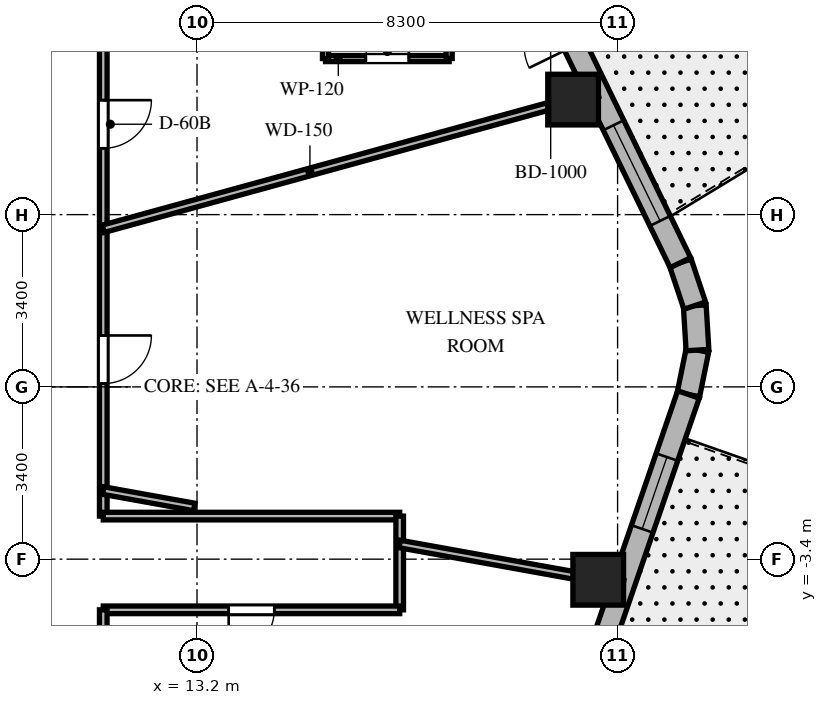
"""IFC4 building model, lengths in metres.
Left out: names, types, materials, properties, quantities, classifications, styles, units other than length and angle.
Written with IfcOpenShell. Run it as: python <this file> out.ifc"""

import sys

from ifc_helpers import new_model, si_unit, direction, frame, frame_2d, origin, origin_2d, place, context, subcontext, project, spatial, rectangle, extrude, element, fill, save


model = new_model("IFC4")
c1 = context("Model", 3, precision=1e-05, world=origin(), true_north=direction((0.0, 1.0)))
c2 = subcontext(c1, "Body", "Model", "MODEL_VIEW")
j1 = project(units=[si_unit("LENGTHUNIT", "METRE"), si_unit("PLANEANGLEUNIT", "RADIAN")], contexts=[c1])
p1 = place(None, origin())
s1 = spatial("IfcSite", under=j1, at=p1, CompositionType="ELEMENT")
p2 = place(p1, origin())
s2 = spatial("IfcBuilding", under=s1, at=p2, CompositionType="ELEMENT")
p3 = place(p2, frame((0.0, 0.0, 233.1)))
s3 = spatial("IfcBuildingStorey", under=s2, at=p3, CompositionType="ELEMENT", Elevation=233.1)
for number, where, z_axis, x_axis in (
    (1, (21.118, -3.807, 0.0), (0.0, 0.0, 1.0), (1.0, 0.0, 0.0)),
    (2, (20.622, 5.67, 0.0), (0.0, 0.0, 1.0), (1.0, 0.0, 0.0)),
):
    element("IfcColumn", number, at=place(p3, frame(where, z_axis=z_axis, x_axis=x_axis)), inside=s3, PredefinedType="COLUMN", context=c2, shape_type="SweptSolid", body=[
        extrude(rectangle(XDim=1.0, YDim=1.0, at=origin_2d()), origin(), (0.0, 0.0, 1.0), 3.8),
    ])
p4 = place(p3, frame((22.898, -0.15, 0.0), z_axis=(0.0, 0.0, 1.0), x_axis=(0.199055826889, 0.979988151858, 0.0)))
e3 = element("IfcWall", 3, at=p4, inside=s3, PredefinedType="SOLIDWALL", context=c2, shape_type="SweptSolid", body=[
    extrude(rectangle(XDim=0.894, YDim=0.45, at=frame_2d((0.447, 0.0))), origin(), (0.0, 0.0, 1.0), 3.5),
])
p5 = place(p3, frame((23.076, 0.727, 0.0), z_axis=(0.0, 0.0, 1.0), x_axis=(-0.060805222108, 0.998149650586, 0.0)))
e4 = element("IfcWall", 4, at=p5, inside=s3, PredefinedType="SOLIDWALL", context=c2, shape_type="SweptSolid", body=[
    extrude(rectangle(XDim=0.879, YDim=0.45, at=frame_2d((0.44, 0.0))), origin(), (0.0, 0.0, 1.0), 3.5),
])
p6 = place(p3, frame((23.023, 1.604, 0.0), z_axis=(0.0, 0.0, 1.0), x_axis=(-0.316801227695, 0.948491951537, 0.0)))
e5 = element("IfcWall", 5, at=p6, inside=s3, PredefinedType="SOLIDWALL", context=c2, shape_type="SweptSolid", body=[
    extrude(rectangle(XDim=0.894, YDim=0.45, at=frame_2d((0.447, 0.0))), origin(), (0.0, 0.0, 1.0), 3.5),
])
p7 = place(p3, frame((16.324, -19.275, 0.0), z_axis=(0.0, 0.0, 1.0), x_axis=(0.325083142304, 0.945685439557, 0.0)))
e6 = element("IfcWall", 6, at=p7, inside=s3, PredefinedType="SOLIDWALL", context=c2, shape_type="SweptSolid", body=[
    extrude(rectangle(XDim=20.224, YDim=0.45, at=frame_2d((10.112, 0.0))), origin(), (0.0, 0.0, 1.0), 3.5),
])
p8 = place(p7, frame((5.062, 0.0, 0.0)))
e7 = element("IfcOpeningElement", 7, at=p8, cuts=e6, PredefinedType="OPENING", context=c2, shape_type="SweptSolid", body=[
    extrude(rectangle(XDim=0.95, YDim=2.15, at=frame_2d((0.475, 1.075))), frame((0.0, 0.235, 0.0), z_axis=(0.0, -1.0, 0.0), x_axis=(1.0, 0.0, 0.0)), (0.0, 0.0, 1.0), 0.47),
])
p9 = place(p7, frame((1.253, 0.0, 0.8)))
e8 = element("IfcOpeningElement", 8, at=p9, cuts=e6, PredefinedType="OPENING", context=c2, shape_type="SweptSolid", body=[
    extrude(rectangle(XDim=1.5, YDim=1.8, at=frame_2d((0.75, 0.9))), frame((0.0, 0.235, 0.0), z_axis=(0.0, -1.0, 0.0), x_axis=(1.0, 0.0, 0.0)), (0.0, 0.0, 1.0), 0.47),
])
p10 = place(p7, frame((6.904, 0.0, 0.8)))
e9 = element("IfcOpeningElement", 9, at=p10, cuts=e6, PredefinedType="OPENING", context=c2, shape_type="SweptSolid", body=[
    extrude(rectangle(XDim=1.5, YDim=1.8, at=frame_2d((0.75, 0.9))), frame((0.0, 0.235, 0.0), z_axis=(0.0, -1.0, 0.0), x_axis=(1.0, 0.0, 0.0)), (0.0, 0.0, 1.0), 0.47),
])
p11 = place(p7, frame((11.885, 0.0, 0.8)))
e10 = element("IfcOpeningElement", 10, at=p11, cuts=e6, PredefinedType="OPENING", context=c2, shape_type="SweptSolid", body=[
    extrude(rectangle(XDim=1.5, YDim=1.8, at=frame_2d((0.75, 0.9))), frame((0.0, 0.235, 0.0), z_axis=(0.0, -1.0, 0.0), x_axis=(1.0, 0.0, 0.0)), (0.0, 0.0, 1.0), 0.47),
])
p12 = place(p7, frame((17.418, 0.0, 0.8)))
e11 = element("IfcOpeningElement", 11, at=p12, cuts=e6, PredefinedType="OPENING", context=c2, shape_type="SweptSolid", body=[
    extrude(rectangle(XDim=1.5, YDim=1.8, at=frame_2d((0.75, 0.9))), frame((0.0, 0.235, 0.0), z_axis=(0.0, -1.0, 0.0), x_axis=(1.0, 0.0, 0.0)), (0.0, 0.0, 1.0), 0.47),
])
p13 = place(p3, frame((22.74, 2.452, 0.0), z_axis=(0.0, 0.0, 1.0), x_axis=(-0.437753424814, 0.899095066755, 0.0)))
e12 = element("IfcWall", 12, at=p13, inside=s3, PredefinedType="SOLIDWALL", context=c2, shape_type="SweptSolid", body=[
    extrude(rectangle(XDim=19.137, YDim=0.45, at=frame_2d((9.569, 0.0))), origin(), (0.0, 0.0, 1.0), 3.5),
])
p14 = place(p13, frame((4.763, 0.0, 0.0)))
e13 = element("IfcOpeningElement", 13, at=p14, cuts=e12, PredefinedType="OPENING", context=c2, shape_type="SweptSolid", body=[
    extrude(rectangle(XDim=1.0, YDim=2.15, at=frame_2d((0.5, 1.075))), frame((0.0, 0.235, 0.0), z_axis=(0.0, -1.0, 0.0), x_axis=(1.0, 0.0, 0.0)), (0.0, 0.0, 1.0), 0.47),
])
p15 = place(p13, frame((6.851, 0.0, 0.8)))
e14 = element("IfcOpeningElement", 14, at=p15, cuts=e12, PredefinedType="OPENING", context=c2, shape_type="SweptSolid", body=[
    extrude(rectangle(XDim=2.1, YDim=1.85, at=frame_2d((1.05, 0.925))), frame((0.0, 0.235, 0.0), z_axis=(0.0, -1.0, 0.0), x_axis=(1.0, 0.0, 0.0)), (0.0, 0.0, 1.0), 0.47),
])
p16 = place(p13, frame((11.545, 0.0, 0.8)))
e15 = element("IfcOpeningElement", 15, at=p16, cuts=e12, PredefinedType="OPENING", context=c2, shape_type="SweptSolid", body=[
    extrude(rectangle(XDim=2.1, YDim=1.85, at=frame_2d((1.05, 0.925))), frame((0.0, 0.235, 0.0), z_axis=(0.0, -1.0, 0.0), x_axis=(1.0, 0.0, 0.0)), (0.0, 0.0, 1.0), 0.47),
])
p17 = place(p13, frame((16.173, 0.0, 0.8)))
e16 = element("IfcOpeningElement", 16, at=p17, cuts=e12, PredefinedType="OPENING", context=c2, shape_type="SweptSolid", body=[
    extrude(rectangle(XDim=2.1, YDim=1.85, at=frame_2d((1.05, 0.925))), frame((0.0, 0.235, 0.0), z_axis=(0.0, -1.0, 0.0), x_axis=(1.0, 0.0, 0.0)), (0.0, 0.0, 1.0), 0.47),
])
p18 = place(p13, frame((0.916, 0.0, 0.8)))
e17 = element("IfcOpeningElement", 17, at=p18, cuts=e12, PredefinedType="OPENING", context=c2, shape_type="SweptSolid", body=[
    extrude(rectangle(XDim=2.1, YDim=1.85, at=frame_2d((1.05, 0.925))), frame((0.0, 0.235, 0.0), z_axis=(0.0, -1.0, 0.0), x_axis=(1.0, 0.0, 0.0)), (0.0, 0.0, 1.0), 0.47),
])
p19 = place(p3, frame((11.35, 9.85, 0.0), z_axis=(0.0, 0.0, 1.0), x_axis=(0.0, -1.0, 0.0)))
e18 = element("IfcWall", 18, at=p19, inside=s3, PredefinedType="PARTITIONING", context=c2, shape_type="SweptSolid", body=[
    extrude(rectangle(XDim=12.4, YDim=0.15, at=frame_2d((6.2, 0.0))), origin(), (0.0, 0.0, 1.0), 2.99),
])
p20 = place(p19, frame((4.191, 0.0, 0.0)))
e19 = element("IfcOpeningElement", 19, at=p20, cuts=e18, PredefinedType="OPENING", context=c2, shape_type="SweptSolid", body=[
    extrude(rectangle(XDim=0.95, YDim=2.03, at=frame_2d((0.475, 1.015))), frame((0.0, 0.085, 0.0), z_axis=(0.0, -1.0, 0.0), x_axis=(1.0, 0.0, 0.0)), (0.0, 0.0, 1.0), 0.17),
])
p21 = place(p19, frame((0.994, 0.0, 0.0)))
e20 = element("IfcOpeningElement", 20, at=p21, cuts=e18, PredefinedType="OPENING", context=c2, shape_type="SweptSolid", body=[
    extrude(rectangle(XDim=0.9, YDim=2.03, at=frame_2d((0.45, 1.015))), frame((0.0, 0.085, 0.0), z_axis=(0.0, -1.0, 0.0), x_axis=(1.0, 0.0, 0.0)), (0.0, 0.0, 1.0), 0.17),
])
p22 = place(p19, frame((8.835, 0.0, 0.0)))
e21 = element("IfcOpeningElement", 21, at=p22, cuts=e18, PredefinedType="OPENING", context=c2, shape_type="SweptSolid", body=[
    extrude(rectangle(XDim=0.95, YDim=2.03, at=frame_2d((0.475, 1.015))), frame((0.0, 0.085, 0.0), z_axis=(0.0, -1.0, 0.0), x_axis=(1.0, 0.0, 0.0)), (0.0, 0.0, 1.0), 0.17),
])
p23 = place(p3, frame((11.35, -2.55, 0.0), z_axis=(0.0, 0.0, 1.0), x_axis=(1.0, 0.0, 0.0)))
e22 = element("IfcWall", 22, at=p23, inside=s3, PredefinedType="PARTITIONING", context=c2, shape_type="SweptSolid", body=[
    extrude(rectangle(XDim=5.85, YDim=0.15, at=frame_2d((2.925, 0.0))), origin(), (0.0, 0.0, 1.0), 2.94),
])
p24 = place(p3, frame((17.2, -2.55, 0.0), z_axis=(0.0, 0.0, 1.0), x_axis=(0.0, -1.0, 0.0)))
e23 = element("IfcWall", 23, at=p24, inside=s3, PredefinedType="PARTITIONING", context=c2, shape_type="SweptSolid", body=[
    extrude(rectangle(XDim=1.85, YDim=0.15, at=frame_2d((0.925, 0.0))), origin(), (0.0, 0.0, 1.0), 2.94),
])
p25 = place(p3, frame((17.2, -4.4, 0.0), z_axis=(0.0, 0.0, 1.0), x_axis=(-1.0, 0.0, 0.0)))
e24 = element("IfcWall", 24, at=p25, inside=s3, PredefinedType="PARTITIONING", context=c2, shape_type="SweptSolid", body=[
    extrude(rectangle(XDim=5.85, YDim=0.15, at=frame_2d((2.925, 0.0))), origin(), (0.0, 0.0, 1.0), 2.94),
])
p26 = place(p25, frame((2.475, 0.0, 0.0)))
e25 = element("IfcOpeningElement", 25, at=p26, cuts=e24, PredefinedType="OPENING", context=c2, shape_type="SweptSolid", body=[
    extrude(rectangle(XDim=0.9, YDim=2.03, at=frame_2d((0.45, 1.015))), frame((0.0, 0.085, 0.0), z_axis=(0.0, -1.0, 0.0), x_axis=(1.0, 0.0, 0.0)), (0.0, 0.0, 1.0), 0.17),
])
p27 = place(p3, frame((11.35, -4.4, 0.0), z_axis=(0.0, 0.0, 1.0), x_axis=(0.0, -1.0, 0.0)))
e26 = element("IfcWall", 26, at=p27, inside=s3, PredefinedType="PARTITIONING", context=c2, shape_type="SweptSolid", body=[
    extrude(rectangle(XDim=5.45, YDim=0.15, at=frame_2d((2.725, 0.0))), origin(), (0.0, 0.0, 1.0), 2.99),
])
p28 = place(p27, frame((2.955, 0.0, 0.0)))
e27 = element("IfcOpeningElement", 27, at=p28, cuts=e26, PredefinedType="OPENING", context=c2, shape_type="SweptSolid", body=[
    extrude(rectangle(XDim=0.9, YDim=2.03, at=frame_2d((0.45, 1.015))), frame((0.0, 0.085, 0.0), z_axis=(0.0, -1.0, 0.0), x_axis=(1.0, 0.0, 0.0)), (0.0, 0.0, 1.0), 0.17),
])
p29 = place(p3, frame((11.35, 3.121, 0.0), z_axis=(0.0, 0.0, 1.0), x_axis=(0.964212793822, 0.265129568758, 0.0)))
e28 = element("IfcWall", 28, at=p29, inside=s3, PredefinedType="PARTITIONING", context=c2, shape_type="SweptSolid", body=[
    extrude(rectangle(XDim=10.12, YDim=0.15, at=frame_2d((5.06, 0.0))), origin(), (0.0, 0.0, 1.0), 2.74),
])
p30 = place(p3, frame((11.35, -2.046, 0.0), z_axis=(0.0, 0.0, 1.0), x_axis=(0.984127783205, -0.177461281195, 0.0)))
e29 = element("IfcWall", 29, at=p30, inside=s3, PredefinedType="PARTITIONING", context=c2, shape_type="SweptSolid", body=[
    extrude(rectangle(XDim=1.826, YDim=0.15, at=frame_2d((0.913, 0.0))), origin(), (0.0, 0.0, 1.0), 3.5),
])
p31 = place(p3, frame((17.2, -3.101, 0.0), z_axis=(0.0, 0.0, 1.0), x_axis=(0.98413465883, -0.177423147559, 0.0)))
e30 = element("IfcWall", 30, at=p31, inside=s3, PredefinedType="PARTITIONING", context=c2, shape_type="SweptSolid", body=[
    extrude(rectangle(XDim=4.482, YDim=0.15, at=frame_2d((2.241, 0.0))), origin(), (0.0, 0.0, 1.0), 2.74),
])
p32 = place(p3, frame((15.736, 6.48, 0.0), z_axis=(0.0, 0.0, 1.0), x_axis=(1.0, 0.0, 0.0)))
e31 = element("IfcWall", 31, at=p32, inside=s3, PredefinedType="PARTITIONING", context=c2, shape_type="SweptSolid", body=[
    extrude(rectangle(XDim=2.44, YDim=0.12, at=frame_2d((1.22, 0.0))), origin(), (0.0, 0.0, 1.0), 2.99),
])
p33 = place(p32, frame((0.795, 0.0, 0.0)))
e32 = element("IfcOpeningElement", 32, at=p33, cuts=e31, PredefinedType="OPENING", context=c2, shape_type="SweptSolid", body=[
    extrude(rectangle(XDim=0.85, YDim=2.03, at=frame_2d((0.425, 1.015))), frame((0.0, 0.07, 0.0), z_axis=(0.0, -1.0, 0.0), x_axis=(1.0, 0.0, 0.0)), (0.0, 0.0, 1.0), 0.14),
])
p34 = place(p3, frame((18.176, 6.48, 0.0), z_axis=(0.0, 0.0, 1.0), x_axis=(0.0, 1.0, 0.0)))
e33 = element("IfcWall", 33, at=p34, inside=s3, PredefinedType="PARTITIONING", context=c2, shape_type="SweptSolid", body=[
    extrude(rectangle(XDim=2.61, YDim=0.12, at=frame_2d((1.305, 0.0))), origin(), (0.0, 0.0, 1.0), 3.5),
])
p35 = place(p3, frame((15.736, 9.09, 0.0), z_axis=(0.0, 0.0, 1.0), x_axis=(0.0, -1.0, 0.0)))
e34 = element("IfcWall", 34, at=p35, inside=s3, PredefinedType="PARTITIONING", context=c2, shape_type="SweptSolid", body=[
    extrude(rectangle(XDim=2.61, YDim=0.12, at=frame_2d((1.305, 0.0))), origin(), (0.0, 0.0, 1.0), 2.99),
])
p36 = place(p12, origin())
e35 = element("IfcWindow", 35, at=p36, inside=s3, PartitioningType="SINGLE_PANEL", PredefinedType="WINDOW", context=c2, shape_type="SweptSolid", body=[
    extrude(rectangle(XDim=1.5, YDim=1.8, at=frame_2d((0.75, 0.9))), frame((0.0, 0.03, 0.0), z_axis=(0.0, -1.0, 0.0), x_axis=(1.0, 0.0, 0.0)), (0.0, 0.0, 1.0), 0.06),
])
fill(e11, e35)
p37 = place(p18, origin())
e36 = element("IfcWindow", 36, at=p37, inside=s3, PartitioningType="SINGLE_PANEL", PredefinedType="WINDOW", context=c2, shape_type="SweptSolid", body=[
    extrude(rectangle(XDim=2.1, YDim=1.85, at=frame_2d((1.05, 0.925))), frame((0.0, 0.03, 0.0), z_axis=(0.0, -1.0, 0.0), x_axis=(1.0, 0.0, 0.0)), (0.0, 0.0, 1.0), 0.06),
])
fill(e17, e36)
p38 = place(p20, origin())
e37 = element("IfcDoor", 37, at=p38, inside=s3, OperationType="SINGLE_SWING_LEFT", PredefinedType="DOOR", context=c2, shape_type="SweptSolid", body=[
    extrude(rectangle(XDim=0.95, YDim=2.03, at=frame_2d((0.475, 1.015))), frame((0.0, 0.025, 0.0), z_axis=(0.0, -1.0, 0.0), x_axis=(1.0, 0.0, 0.0)), (0.0, 0.0, 1.0), 0.05),
])
fill(e19, e37)
p39 = place(p33, origin())
e38 = element("IfcDoor", 38, at=p39, inside=s3, OperationType="SINGLE_SWING_RIGHT", PredefinedType="DOOR", context=c2, shape_type="SweptSolid", body=[
    extrude(rectangle(XDim=0.85, YDim=2.03, at=frame_2d((0.425, 1.015))), frame((0.0, 0.025, 0.0), z_axis=(0.0, -1.0, 0.0), x_axis=(1.0, 0.0, 0.0)), (0.0, 0.0, 1.0), 0.05),
])
fill(e32, e38)
p40 = place(p26, origin())
e39 = element("IfcDoor", 39, at=p40, inside=s3, OperationType="SINGLE_SWING_RIGHT", PredefinedType="DOOR", context=c2, shape_type="SweptSolid", body=[
    extrude(rectangle(XDim=0.9, YDim=2.03, at=frame_2d((0.45, 1.015))), frame((0.0, 0.025, 0.0), z_axis=(0.0, -1.0, 0.0), x_axis=(1.0, 0.0, 0.0)), (0.0, 0.0, 1.0), 0.05),
])
fill(e25, e39)
p41 = place(p22, origin())
e40 = element("IfcDoor", 40, at=p41, inside=s3, OperationType="SINGLE_SWING_LEFT", PredefinedType="DOOR", context=c2, shape_type="SweptSolid", body=[
    extrude(rectangle(XDim=0.95, YDim=2.03, at=frame_2d((0.475, 1.015))), frame((0.0, 0.025, 0.0), z_axis=(0.0, -1.0, 0.0), x_axis=(1.0, 0.0, 0.0)), (0.0, 0.0, 1.0), 0.05),
])
fill(e21, e40)
save(model, sys.argv[1])
